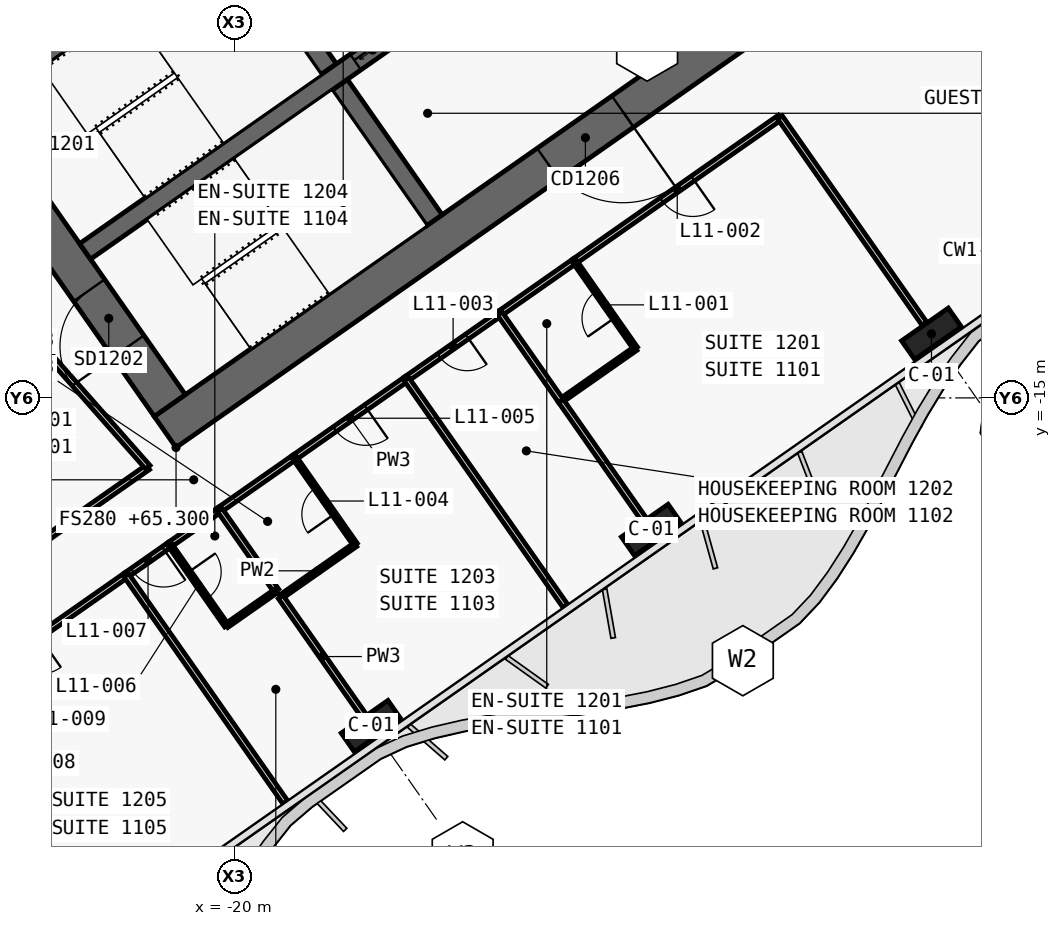
"""IFC4 building model, lengths in metres.
Left out: names, types, materials, properties, quantities, classifications, styles, units other than length and angle.
Written with IfcOpenShell. Run it as: python <this file> out.ifc"""

import sys

from ifc_helpers import new_model, si_unit, direction, frame, frame_2d, origin, origin_2d, place, context, subcontext, project, spatial, polyline, rectangle, outline, extrude, element, fill, save


model = new_model("IFC4")
c1 = context("Model", 3, precision=1e-05, world=origin(), true_north=direction((0.0, 1.0)))
c2 = subcontext(c1, "Body", "Model", "MODEL_VIEW")
j1 = project(units=[si_unit("LENGTHUNIT", "METRE"), si_unit("PLANEANGLEUNIT", "RADIAN")], contexts=[c1])
p1 = place(None, origin())
s1 = spatial("IfcSite", under=j1, at=p1, CompositionType="ELEMENT")
p2 = place(p1, origin())
s2 = spatial("IfcBuilding", under=s1, at=p2, CompositionType="ELEMENT")
p3 = place(p2, frame((0.0, 0.0, 65.3)))
s3 = spatial("IfcBuildingStorey", under=s2, at=p3, CompositionType="ELEMENT", Elevation=65.3)
p4 = place(p3, frame((0.037, 11.867, 0.0), z_axis=(0.0, 0.0, 1.0), x_axis=(-0.819155306259, -0.573571777746, 0.0)))
e1 = element("IfcWall", 1, at=p4, inside=s3, PredefinedType="SHEAR", context=c2, shape_type="SweptSolid", body=[
    extrude(outline(polyline([(33.837, 0.5), (0.7, 0.5), (0.0, -0.5), (33.837, -0.5), (33.837, 0.5)])), origin(), (0.0, 0.0, 1.0), 3.6),
])
p5 = place(p3, frame((0.037, -0.585, 0.0), z_axis=(0.0, 0.0, 1.0), x_axis=(-0.819157152511, -0.573569140985, 0.0)))
e2 = element("IfcWall", 2, at=p5, inside=s3, PredefinedType="SHEAR", context=c2, shape_type="SweptSolid", body=[
    extrude(outline(polyline([(26.695, 0.5), (0.7, 0.5), (0.0, -0.5), (26.695, -0.5), (26.695, 0.5)])), origin(), (0.0, 0.0, 1.0), 3.6),
])
p6 = place(p5, frame((2.995, 0.0, 0.0)))
e3 = element("IfcOpeningElement", 3, at=p6, cuts=e2, PredefinedType="OPENING", context=c2, shape_type="SweptSolid", body=[
    extrude(rectangle(XDim=2.4, YDim=2.1, at=frame_2d((1.2, 1.05))), frame((0.0, 0.51, 0.0), z_axis=(0.0, -1.0, 0.0), x_axis=(1.0, 0.0, 0.0)), (0.0, 0.0, 1.0), 1.02),
])
p7 = place(p5, frame((11.995, 0.0, 0.0)))
e4 = element("IfcOpeningElement", 4, at=p7, cuts=e2, PredefinedType="OPENING", context=c2, shape_type="SweptSolid", body=[
    extrude(rectangle(XDim=2.4, YDim=2.1, at=frame_2d((1.2, 1.05))), frame((0.0, 0.51, 0.0), z_axis=(0.0, -1.0, 0.0), x_axis=(1.0, 0.0, 0.0)), (0.0, 0.0, 1.0), 1.02),
])
p8 = place(p3, frame((-21.708, -15.2, 0.0), z_axis=(0.0, 0.0, 1.0), x_axis=(-0.573576324356, 0.819152122709, 0.0)))
e5 = element("IfcWall", 5, at=p8, inside=s3, PredefinedType="SHEAR", context=c2, shape_type="SweptSolid", body=[
    extrude(outline(polyline([(0.0, 0.5), (0.0, -0.5), (9.2, -0.5), (9.2, 0.5), (0.0, 0.5)])), origin(), (0.0, 0.0, 1.0), 3.6),
])
p9 = place(p8, frame((6.1, 0.0, 0.0)))
e6 = element("IfcOpeningElement", 6, at=p9, cuts=e5, PredefinedType="OPENING", context=c2, shape_type="SweptSolid", body=[
    extrude(rectangle(XDim=1.8, YDim=2.1, at=frame_2d((0.9, 1.05))), frame((0.0, 0.51, 0.0), z_axis=(0.0, -1.0, 0.0), x_axis=(1.0, 0.0, 0.0)), (0.0, 0.0, 1.0), 1.02),
])
p10 = place(p8, frame((1.9, 0.0, 0.0)))
e7 = element("IfcOpeningElement", 7, at=p10, cuts=e5, PredefinedType="OPENING", context=c2, shape_type="SweptSolid", body=[
    extrude(rectangle(XDim=1.8, YDim=2.1, at=frame_2d((0.9, 1.05))), frame((0.0, 0.51, 0.0), z_axis=(0.0, -1.0, 0.0), x_axis=(1.0, 0.0, 0.0)), (0.0, 0.0, 1.0), 1.02),
])
p11 = place(p3, frame((-14.745, -10.324, 0.0), z_axis=(0.0, 0.0, 1.0), x_axis=(-0.57356780395, 0.819158088694, 0.0)))
e8 = element("IfcWall", 8, at=p11, inside=s3, PredefinedType="SHEAR", context=c2, shape_type="SweptSolid", body=[
    extrude(outline(polyline([(4.35, 0.25), (0.0, 0.25), (0.0, -0.25), (4.35, -0.25), (4.35, 0.25)])), origin(), (0.0, 0.0, 1.0), 3.6),
])
p12 = place(p3, frame((-17.527, -6.352, 0.0), z_axis=(0.0, 0.0, 1.0), x_axis=(-0.573530143085, 0.819184457233, 0.0)))
e9 = element("IfcWall", 9, at=p12, inside=s3, PredefinedType="SHEAR", context=c2, shape_type="SweptSolid", body=[
    extrude(outline(polyline([(4.35, -0.25), (4.35, 0.25), (0.0, 0.25), (0.0, -0.25), (4.35, -0.25)])), origin(), (0.0, 0.0, 1.0), 3.6),
])
p13 = place(p3, frame((-2.638, 3.768, 0.0), z_axis=(0.0, 0.0, 1.0), x_axis=(-0.819148977158, -0.573580816643, 0.0)))
e10 = element("IfcWall", 10, at=p13, inside=s3, PredefinedType="SHEAR", context=c2, shape_type="SweptSolid", body=[
    extrude(outline(polyline([(26.0, 0.25), (0.0, 0.25), (0.0, -0.25), (26.0, -0.25), (26.0, 0.25)])), origin(), (0.0, 0.0, 1.0), 3.6),
])
p14 = place(p13, frame((1.169, 0.0, 0.0)))
e11 = element("IfcOpeningElement", 11, at=p14, cuts=e10, PredefinedType="OPENING", context=c2, shape_type="SweptSolid", body=[
    extrude(rectangle(XDim=1.1, YDim=2.1, at=frame_2d((0.55, 1.05))), frame((0.0, 0.26, 0.0), z_axis=(0.0, -1.0, 0.0), x_axis=(1.0, 0.0, 0.0)), (0.0, 0.0, 1.0), 0.52),
])
p15 = place(p13, frame((3.206, 0.0, 0.0)))
e12 = element("IfcOpeningElement", 12, at=p15, cuts=e10, PredefinedType="OPENING", context=c2, shape_type="SweptSolid", body=[
    extrude(rectangle(XDim=1.1, YDim=2.1, at=frame_2d((0.55, 1.05))), frame((0.0, 0.26, 0.0), z_axis=(0.0, -1.0, 0.0), x_axis=(1.0, 0.0, 0.0)), (0.0, 0.0, 1.0), 0.52),
])
p16 = place(p13, frame((5.244, 0.0, 0.0)))
e13 = element("IfcOpeningElement", 13, at=p16, cuts=e10, PredefinedType="OPENING", context=c2, shape_type="SweptSolid", body=[
    extrude(rectangle(XDim=1.1, YDim=2.1, at=frame_2d((0.55, 1.05))), frame((0.0, 0.26, 0.0), z_axis=(0.0, -1.0, 0.0), x_axis=(1.0, 0.0, 0.0)), (0.0, 0.0, 1.0), 0.52),
])
p17 = place(p13, frame((7.281, 0.0, 0.0)))
e14 = element("IfcOpeningElement", 14, at=p17, cuts=e10, PredefinedType="OPENING", context=c2, shape_type="SweptSolid", body=[
    extrude(rectangle(XDim=1.1, YDim=2.1, at=frame_2d((0.55, 1.05))), frame((0.0, 0.26, 0.0), z_axis=(0.0, -1.0, 0.0), x_axis=(1.0, 0.0, 0.0)), (0.0, 0.0, 1.0), 0.52),
])
p18 = place(p13, frame((9.688, 0.0, 0.0)))
e15 = element("IfcOpeningElement", 15, at=p18, cuts=e10, PredefinedType="OPENING", context=c2, shape_type="SweptSolid", body=[
    extrude(rectangle(XDim=1.1, YDim=2.1, at=frame_2d((0.55, 1.05))), frame((0.0, 0.26, 0.0), z_axis=(0.0, -1.0, 0.0), x_axis=(1.0, 0.0, 0.0)), (0.0, 0.0, 1.0), 0.52),
])
p19 = place(p13, frame((11.863, 0.0, 0.0)))
e16 = element("IfcOpeningElement", 16, at=p19, cuts=e10, PredefinedType="OPENING", context=c2, shape_type="SweptSolid", body=[
    extrude(rectangle(XDim=1.1, YDim=2.1, at=frame_2d((0.55, 1.05))), frame((0.0, 0.26, 0.0), z_axis=(0.0, -1.0, 0.0), x_axis=(1.0, 0.0, 0.0)), (0.0, 0.0, 1.0), 0.52),
])
p20 = place(p13, frame((14.038, 0.0, 0.0)))
e17 = element("IfcOpeningElement", 17, at=p20, cuts=e10, PredefinedType="OPENING", context=c2, shape_type="SweptSolid", body=[
    extrude(rectangle(XDim=1.1, YDim=2.1, at=frame_2d((0.55, 1.05))), frame((0.0, 0.26, 0.0), z_axis=(0.0, -1.0, 0.0), x_axis=(1.0, 0.0, 0.0)), (0.0, 0.0, 1.0), 0.52),
])
p21 = place(p13, frame((16.212, 0.0, 0.0)))
e18 = element("IfcOpeningElement", 18, at=p21, cuts=e10, PredefinedType="OPENING", context=c2, shape_type="SweptSolid", body=[
    extrude(rectangle(XDim=1.1, YDim=2.1, at=frame_2d((0.55, 1.05))), frame((0.0, 0.26, 0.0), z_axis=(0.0, -1.0, 0.0), x_axis=(1.0, 0.0, 0.0)), (0.0, 0.0, 1.0), 0.52),
])
for number, where, z_axis, x_axis in (
    (19, (-1.665, -13.313, 0.0), (0.0, 0.0, 1.0), (-0.819, -0.574, 0.0)),
    (20, (-9.038, -18.475, 0.0), (0.0, 0.0, 1.0), (-0.819, -0.574, 0.0)),
    (21, (-16.41, -23.637, 0.0), (0.0, 0.0, 1.0), (-0.819, -0.574, 0.0)),
):
    element("IfcColumn", number, at=place(p3, frame(where, z_axis=z_axis, x_axis=x_axis)), inside=s3, PredefinedType="COLUMN", context=c2, shape_type="SweptSolid", body=[
        extrude(rectangle(XDim=1.5, YDim=0.6, at=origin_2d()), origin(), (0.0, 0.0, 1.0), 3.6),
    ])
p22 = place(p3, frame((-28.917, -21.469, 0.0), z_axis=(0.0, 0.0, 1.0), x_axis=(0.819152599934, 0.573575642807, 0.0)))
e22 = element("IfcWall", 22, at=p22, inside=s3, PredefinedType="PARTITIONING", context=c2, shape_type="SweptSolid", body=[
    extrude(rectangle(XDim=8.098, YDim=0.15, at=frame_2d((4.049, 0.0))), origin(), (0.0, 0.0, 1.0), 2.6),
])
p23 = place(p22, frame((3.599, 0.0, 0.0)))
e23 = element("IfcOpeningElement", 23, at=p23, cuts=e22, PredefinedType="OPENING", context=c2, shape_type="SweptSolid", body=[
    extrude(rectangle(XDim=0.9, YDim=2.1, at=frame_2d((0.45, 1.05))), frame((0.0, 0.085, 0.0), z_axis=(0.0, -1.0, 0.0), x_axis=(1.0, 0.0, 0.0)), (0.0, 0.0, 1.0), 0.17),
])
p24 = place(p3, frame((-5.652, -7.62, 0.0), z_axis=(0.0, 0.0, 1.0), x_axis=(-0.819155459934, -0.573571558274, 0.0)))
e24 = element("IfcWall", 24, at=p24, inside=s3, PredefinedType="PARTITIONING", context=c2, shape_type="SweptSolid", body=[
    extrude(rectangle(XDim=6.601, YDim=0.15, at=frame_2d((3.301, 0.0))), origin(), (0.0, 0.0, 1.0), 2.6),
])
p25 = place(p24, frame((2.8, 0.0, 0.0)))
e25 = element("IfcOpeningElement", 25, at=p25, cuts=e24, PredefinedType="OPENING", context=c2, shape_type="SweptSolid", body=[
    extrude(rectangle(XDim=1.0, YDim=2.1, at=frame_2d((0.5, 1.05))), frame((0.0, 0.085, 0.0), z_axis=(0.0, -1.0, 0.0), x_axis=(1.0, 0.0, 0.0)), (0.0, 0.0, 1.0), 0.17),
])
p26 = place(p3, frame((-11.056, -11.404, 0.0), z_axis=(0.0, 0.0, 1.0), x_axis=(-0.819146032251, -0.573585022335, 0.0)))
e26 = element("IfcWall", 26, at=p26, inside=s3, PredefinedType="PARTITIONING", context=c2, shape_type="SweptSolid", body=[
    extrude(rectangle(XDim=2.404, YDim=0.15, at=frame_2d((1.202, 0.0))), origin(), (0.0, 0.0, 1.0), 2.6),
])
p27 = place(p3, frame((-13.022, -12.781, 0.0), z_axis=(0.0, 0.0, 1.0), x_axis=(-0.81916700466, -0.573555070134, 0.0)))
e27 = element("IfcWall", 27, at=p27, inside=s3, PredefinedType="PARTITIONING", context=c2, shape_type="SweptSolid", body=[
    extrude(rectangle(XDim=3.004, YDim=0.15, at=frame_2d((1.502, 0.0))), origin(), (0.0, 0.0, 1.0), 2.6),
])
p28 = place(p27, frame((1.052, 0.0, 0.0)))
e28 = element("IfcOpeningElement", 28, at=p28, cuts=e27, PredefinedType="OPENING", context=c2, shape_type="SweptSolid", body=[
    extrude(rectangle(XDim=0.9, YDim=2.1, at=frame_2d((0.45, 1.05))), frame((0.0, 0.085, 0.0), z_axis=(0.0, -1.0, 0.0), x_axis=(1.0, 0.0, 0.0)), (0.0, 0.0, 1.0), 0.17),
])
p29 = place(p3, frame((-15.48, -14.501, 0.0), z_axis=(0.0, 0.0, 1.0), x_axis=(-0.819145961204, -0.573585123798, 0.0)))
e29 = element("IfcWall", 29, at=p29, inside=s3, PredefinedType="PARTITIONING", context=c2, shape_type="SweptSolid", body=[
    extrude(rectangle(XDim=3.603, YDim=0.15, at=frame_2d((1.802, 0.0))), origin(), (0.0, 0.0, 1.0), 3.32),
])
p30 = place(p29, frame((1.302, 0.0, 0.0)))
e30 = element("IfcOpeningElement", 30, at=p30, cuts=e29, PredefinedType="OPENING", context=c2, shape_type="SweptSolid", body=[
    extrude(rectangle(XDim=1.0, YDim=2.1, at=frame_2d((0.5, 1.05))), frame((0.0, 0.085, 0.0), z_axis=(0.0, -1.0, 0.0), x_axis=(1.0, 0.0, 0.0)), (0.0, 0.0, 1.0), 0.17),
])
p31 = place(p3, frame((-18.429, -16.566, 0.0), z_axis=(0.0, 0.0, 1.0), x_axis=(-0.819146032251, -0.573585022335, 0.0)))
e31 = element("IfcWall", 31, at=p31, inside=s3, PredefinedType="PARTITIONING", context=c2, shape_type="SweptSolid", body=[
    extrude(rectangle(XDim=2.404, YDim=0.15, at=frame_2d((1.202, 0.0))), origin(), (0.0, 0.0, 1.0), 2.6),
])
p32 = place(p3, frame((-21.706, -18.861, 0.0), z_axis=(0.0, 0.0, 1.0), x_axis=(-0.819060210533, -0.573707566205, 0.0)))
e32 = element("IfcWall", 32, at=p32, inside=s3, PredefinedType="PARTITIONING", context=c2, shape_type="SweptSolid", body=[
    extrude(rectangle(XDim=1.403, YDim=0.15, at=frame_2d((0.702, 0.0))), origin(), (0.0, 0.0, 1.0), 3.32),
])
p33 = place(p32, frame((0.201, 0.0, 0.0)))
e33 = element("IfcOpeningElement", 33, at=p33, cuts=e32, PredefinedType="OPENING", context=c2, shape_type="SweptSolid", body=[
    extrude(rectangle(XDim=1.0, YDim=2.1, at=frame_2d((0.5, 1.05))), frame((0.0, 0.085, 0.0), z_axis=(0.0, -1.0, 0.0), x_axis=(1.0, 0.0, 0.0)), (0.0, 0.0, 1.0), 0.17),
])
p34 = place(p3, frame((-20.395, -17.943, 0.0), z_axis=(0.0, 0.0, 1.0), x_axis=(-0.819189013667, -0.573523634986, 0.0)))
e34 = element("IfcWall", 34, at=p34, inside=s3, PredefinedType="PARTITIONING", context=c2, shape_type="SweptSolid", body=[
    extrude(rectangle(XDim=1.604, YDim=0.15, at=frame_2d((0.802, 0.0))), origin(), (0.0, 0.0, 1.0), 2.6),
])
p35 = place(p3, frame((-22.852, -19.664, 0.0), z_axis=(0.0, 0.0, 1.0), x_axis=(-0.819141582452, -0.573591377113, 0.0)))
e35 = element("IfcWall", 35, at=p35, inside=s3, PredefinedType="PARTITIONING", context=c2, shape_type="SweptSolid", body=[
    extrude(rectangle(XDim=6.603, YDim=0.15, at=frame_2d((3.301, 0.0))), origin(), (0.0, 0.0, 1.0), 2.6),
])
p36 = place(p35, frame((2.802, 0.0, 0.0)))
e36 = element("IfcOpeningElement", 36, at=p36, cuts=e35, PredefinedType="OPENING", context=c2, shape_type="SweptSolid", body=[
    extrude(rectangle(XDim=1.0, YDim=2.1, at=frame_2d((0.5, 1.05))), frame((0.0, 0.085, 0.0), z_axis=(0.0, -1.0, 0.0), x_axis=(1.0, 0.0, 0.0)), (0.0, 0.0, 1.0), 0.17),
])
p37 = place(p3, frame((-1.849, -13.051, 0.0), z_axis=(0.0, 0.0, 1.0), x_axis=(-0.573575988258, 0.819152358047, 0.0)))
e37 = element("IfcWall", 37, at=p37, inside=s3, PredefinedType="PARTITIONING", context=c2, shape_type="SweptSolid", body=[
    extrude(rectangle(XDim=6.632, YDim=0.15, at=frame_2d((3.316, 0.0))), origin(), (0.0, 0.0, 1.0), 2.6),
])
p38 = place(p3, frame((-22.284, -16.827, 0.0), z_axis=(0.0, 0.0, 1.0), x_axis=(-0.661545117561, 0.749905365651, 0.0)))
e38 = element("IfcWall", 38, at=p38, inside=s3, PredefinedType="PARTITIONING", context=c2, shape_type="SweptSolid", body=[
    extrude(rectangle(XDim=6.543, YDim=0.15, at=frame_2d((3.271, 0.0))), origin(), (0.0, 0.0, 1.0), 2.6),
])
p39 = place(p3, frame((-11.417, -15.076, 0.0), z_axis=(0.0, 0.0, 1.0), x_axis=(0.819141114317, 0.573592045652, 0.0)))
e39 = element("IfcWall", 39, at=p39, inside=s3, PredefinedType="PARTITIONING", context=c2, shape_type="SweptSolid", body=[
    extrude(rectangle(XDim=2.4, YDim=0.12, at=frame_2d((1.2, 0.0))), origin(), (0.0, 0.0, 1.0), 2.6),
])
p40 = place(p3, frame((-9.451, -13.698, 0.0), z_axis=(0.0, 0.0, 1.0), x_axis=(-0.573591086599, 0.819141785879, 0.0)))
e40 = element("IfcWall", 40, at=p40, inside=s3, PredefinedType="PARTITIONING", context=c2, shape_type="SweptSolid", body=[
    extrude(rectangle(XDim=2.8, YDim=0.12, at=frame_2d((1.4, 0.0))), origin(), (0.0, 0.0, 1.0), 3.32),
])
p41 = place(p40, frame((0.975, 0.0, 0.0)))
e41 = element("IfcOpeningElement", 41, at=p41, cuts=e40, PredefinedType="OPENING", context=c2, shape_type="SweptSolid", body=[
    extrude(rectangle(XDim=0.85, YDim=2.05, at=frame_2d((0.425, 1.025))), frame((0.0, 0.07, 0.0), z_axis=(0.0, -1.0, 0.0), x_axis=(1.0, 0.0, 0.0)), (0.0, 0.0, 1.0), 0.14),
])
p42 = place(p3, frame((-9.221, -18.213, 0.0), z_axis=(0.0, 0.0, 1.0), x_axis=(-0.573594994199, 0.819139049631, 0.0)))
e42 = element("IfcWall", 42, at=p42, inside=s3, PredefinedType="PARTITIONING", context=c2, shape_type="SweptSolid", body=[
    extrude(rectangle(XDim=3.829, YDim=0.15, at=frame_2d((1.915, 0.0))), origin(), (0.0, 0.0, 1.0), 2.6),
])
p43 = place(p3, frame((-11.418, -15.075, 0.0), z_axis=(0.0, 0.0, 1.0), x_axis=(-0.573550118428, 0.819170471667, 0.0)))
e43 = element("IfcWall", 43, at=p43, inside=s3, PredefinedType="PARTITIONING", context=c2, shape_type="SweptSolid", body=[
    extrude(rectangle(XDim=2.8, YDim=0.15, at=frame_2d((1.4, 0.0))), origin(), (0.0, 0.0, 1.0), 2.6),
])
p44 = place(p3, frame((-11.294, -20.482, 0.0), z_axis=(0.0, 0.0, 1.0), x_axis=(-0.573572324301, 0.819154923562, 0.0)))
e44 = element("IfcWall", 44, at=p44, inside=s3, PredefinedType="PARTITIONING", context=c2, shape_type="SweptSolid", body=[
    extrude(rectangle(XDim=7.3, YDim=0.15, at=frame_2d((3.65, 0.0))), origin(), (0.0, 0.0, 1.0), 2.5),
])
p45 = place(p3, frame((-18.79, -20.239, 0.0), z_axis=(0.0, 0.0, 1.0), x_axis=(0.819141114317, 0.573592045652, 0.0)))
e45 = element("IfcWall", 45, at=p45, inside=s3, PredefinedType="PARTITIONING", context=c2, shape_type="SweptSolid", body=[
    extrude(rectangle(XDim=2.4, YDim=0.12, at=frame_2d((1.2, 0.0))), origin(), (0.0, 0.0, 1.0), 2.6),
])
p46 = place(p3, frame((-16.823, -18.861, 0.0), z_axis=(0.0, 0.0, 1.0), x_axis=(-0.573608623498, 0.819129505664, 0.0)))
e46 = element("IfcWall", 46, at=p46, inside=s3, PredefinedType="PARTITIONING", context=c2, shape_type="SweptSolid", body=[
    extrude(rectangle(XDim=2.8, YDim=0.12, at=frame_2d((1.4, 0.0))), origin(), (0.0, 0.0, 1.0), 3.32),
])
p47 = place(p46, frame((0.975, 0.0, 0.0)))
e47 = element("IfcOpeningElement", 47, at=p47, cuts=e46, PredefinedType="OPENING", context=c2, shape_type="SweptSolid", body=[
    extrude(rectangle(XDim=0.85, YDim=2.05, at=frame_2d((0.425, 1.025))), frame((0.0, 0.07, 0.0), z_axis=(0.0, -1.0, 0.0), x_axis=(1.0, 0.0, 0.0)), (0.0, 0.0, 1.0), 0.14),
])
p48 = place(p3, frame((-16.594, -23.375, 0.0), z_axis=(0.0, 0.0, 1.0), x_axis=(-0.573594994199, 0.819139049631, 0.0)))
e48 = element("IfcWall", 48, at=p48, inside=s3, PredefinedType="PARTITIONING", context=c2, shape_type="SweptSolid", body=[
    extrude(rectangle(XDim=3.829, YDim=0.15, at=frame_2d((1.915, 0.0))), origin(), (0.0, 0.0, 1.0), 2.6),
])
p49 = place(p3, frame((-18.904, -20.075, 0.0), z_axis=(0.0, 0.0, 1.0), x_axis=(-0.573651240222, 0.819099660964, 0.0)))
e49 = element("IfcWall", 49, at=p49, inside=s3, PredefinedType="PARTITIONING", context=c2, shape_type="SweptSolid", body=[
    extrude(rectangle(XDim=2.602, YDim=0.15, at=frame_2d((1.301, 0.0))), origin(), (0.0, 0.0, 1.0), 2.6),
])
p50 = place(p3, frame((-21.708, -18.862, 0.0), z_axis=(0.0, 0.0, 1.0), x_axis=(0.573537965655, -0.819178980414, 0.0)))
e50 = element("IfcWall", 50, at=p50, inside=s3, PredefinedType="PARTITIONING", context=c2, shape_type="SweptSolid", body=[
    extrude(rectangle(XDim=2.6, YDim=0.12, at=frame_2d((1.3, 0.0))), origin(), (0.0, 0.0, 1.0), 3.32),
])
p51 = place(p50, frame((0.875, 0.0, 0.0)))
e51 = element("IfcOpeningElement", 51, at=p51, cuts=e50, PredefinedType="OPENING", context=c2, shape_type="SweptSolid", body=[
    extrude(rectangle(XDim=0.85, YDim=2.05, at=frame_2d((0.425, 1.025))), frame((0.0, 0.07, 0.0), z_axis=(0.0, -1.0, 0.0), x_axis=(1.0, 0.0, 0.0)), (0.0, 0.0, 1.0), 0.14),
])
p52 = place(p3, frame((-20.215, -20.992, 0.0), z_axis=(0.0, 0.0, 1.0), x_axis=(0.819131543282, 0.57360571371, 0.0)))
e52 = element("IfcWall", 52, at=p52, inside=s3, PredefinedType="PARTITIONING", context=c2, shape_type="SweptSolid", body=[
    extrude(rectangle(XDim=1.6, YDim=0.12, at=frame_2d((0.8, 0.0))), origin(), (0.0, 0.0, 1.0), 2.6),
])
p53 = place(p3, frame((-18.667, -25.645, 0.0), z_axis=(0.0, 0.0, 1.0), x_axis=(-0.573572324301, 0.819154923562, 0.0)))
e53 = element("IfcWall", 53, at=p53, inside=s3, PredefinedType="PARTITIONING", context=c2, shape_type="SweptSolid", body=[
    extrude(rectangle(XDim=7.3, YDim=0.15, at=frame_2d((3.65, 0.0))), origin(), (0.0, 0.0, 1.0), 2.5),
])
p54 = place(p21, origin())
e54 = element("IfcDoor", 54, at=p54, inside=s3, OperationType="SLIDING_TO_RIGHT", PredefinedType="DOOR", context=c2, shape_type="SweptSolid", body=[
    extrude(rectangle(XDim=1.1, YDim=2.1, at=frame_2d((0.55, 1.05))), frame((0.0, 0.025, 0.0), z_axis=(0.0, -1.0, 0.0), x_axis=(1.0, 0.0, 0.0)), (0.0, 0.0, 1.0), 0.05),
])
fill(e18, e54)
p55 = place(p7, origin())
e55 = element("IfcDoor", 55, at=p55, inside=s3, OperationType="DOUBLE_DOOR_SINGLE_SWING", PredefinedType="DOOR", context=c2, shape_type="SweptSolid", body=[
    extrude(rectangle(XDim=2.4, YDim=2.1, at=frame_2d((1.2, 1.05))), frame((0.0, 0.025, 0.0), z_axis=(0.0, -1.0, 0.0), x_axis=(1.0, 0.0, 0.0)), (0.0, 0.0, 1.0), 0.05),
])
fill(e4, e55)
p56 = place(p10, origin())
e56 = element("IfcDoor", 56, at=p56, inside=s3, OperationType="DOUBLE_DOOR_SINGLE_SWING", PredefinedType="DOOR", context=c2, shape_type="SweptSolid", body=[
    extrude(rectangle(XDim=1.8, YDim=2.1, at=frame_2d((0.9, 1.05))), frame((0.0, 0.025, 0.0), z_axis=(0.0, -1.0, 0.0), x_axis=(1.0, 0.0, 0.0)), (0.0, 0.0, 1.0), 0.05),
])
fill(e7, e56)
p57 = place(p41, origin())
e57 = element("IfcDoor", 57, at=p57, inside=s3, OperationType="SINGLE_SWING_LEFT", PredefinedType="DOOR", context=c2, shape_type="SweptSolid", body=[
    extrude(rectangle(XDim=0.85, YDim=2.05, at=frame_2d((0.425, 1.025))), frame((0.0, 0.025, 0.0), z_axis=(0.0, -1.0, 0.0), x_axis=(1.0, 0.0, 0.0)), (0.0, 0.0, 1.0), 0.05),
])
fill(e41, e57)
p58 = place(p25, origin())
e58 = element("IfcDoor", 58, at=p58, inside=s3, OperationType="SINGLE_SWING_LEFT", PredefinedType="DOOR", context=c2, shape_type="SweptSolid", body=[
    extrude(rectangle(XDim=1.0, YDim=2.1, at=frame_2d((0.5, 1.05))), frame((0.0, 0.025, 0.0), z_axis=(0.0, -1.0, 0.0), x_axis=(1.0, 0.0, 0.0)), (0.0, 0.0, 1.0), 0.05),
])
fill(e25, e58)
p59 = place(p28, origin())
e59 = element("IfcDoor", 59, at=p59, inside=s3, OperationType="SINGLE_SWING_RIGHT", PredefinedType="DOOR", context=c2, shape_type="SweptSolid", body=[
    extrude(rectangle(XDim=0.9, YDim=2.1, at=frame_2d((0.45, 1.05))), frame((0.0, 0.025, 0.0), z_axis=(0.0, -1.0, 0.0), x_axis=(1.0, 0.0, 0.0)), (0.0, 0.0, 1.0), 0.05),
])
fill(e28, e59)
p60 = place(p47, origin())
e60 = element("IfcDoor", 60, at=p60, inside=s3, OperationType="SINGLE_SWING_RIGHT", PredefinedType="DOOR", context=c2, shape_type="SweptSolid", body=[
    extrude(rectangle(XDim=0.85, YDim=2.05, at=frame_2d((0.425, 1.025))), frame((0.0, 0.025, 0.0), z_axis=(0.0, -1.0, 0.0), x_axis=(1.0, 0.0, 0.0)), (0.0, 0.0, 1.0), 0.05),
])
fill(e47, e60)
p61 = place(p30, origin())
e61 = element("IfcDoor", 61, at=p61, inside=s3, OperationType="SINGLE_SWING_LEFT", PredefinedType="DOOR", context=c2, shape_type="SweptSolid", body=[
    extrude(rectangle(XDim=1.0, YDim=2.1, at=frame_2d((0.5, 1.05))), frame((0.0, 0.025, 0.0), z_axis=(0.0, -1.0, 0.0), x_axis=(1.0, 0.0, 0.0)), (0.0, 0.0, 1.0), 0.05),
])
fill(e30, e61)
p62 = place(p51, origin())
e62 = element("IfcDoor", 62, at=p62, inside=s3, OperationType="SINGLE_SWING_LEFT", PredefinedType="DOOR", context=c2, shape_type="SweptSolid", body=[
    extrude(rectangle(XDim=0.85, YDim=2.05, at=frame_2d((0.425, 1.025))), frame((0.0, 0.025, 0.0), z_axis=(0.0, -1.0, 0.0), x_axis=(1.0, 0.0, 0.0)), (0.0, 0.0, 1.0), 0.05),
])
fill(e51, e62)
p63 = place(p33, origin())
e63 = element("IfcDoor", 63, at=p63, inside=s3, OperationType="SINGLE_SWING_RIGHT", PredefinedType="DOOR", context=c2, shape_type="SweptSolid", body=[
    extrude(rectangle(XDim=1.0, YDim=2.1, at=frame_2d((0.5, 1.05))), frame((0.0, 0.025, 0.0), z_axis=(0.0, -1.0, 0.0), x_axis=(1.0, 0.0, 0.0)), (0.0, 0.0, 1.0), 0.05),
])
fill(e33, e63)
save(model, sys.argv[1])
